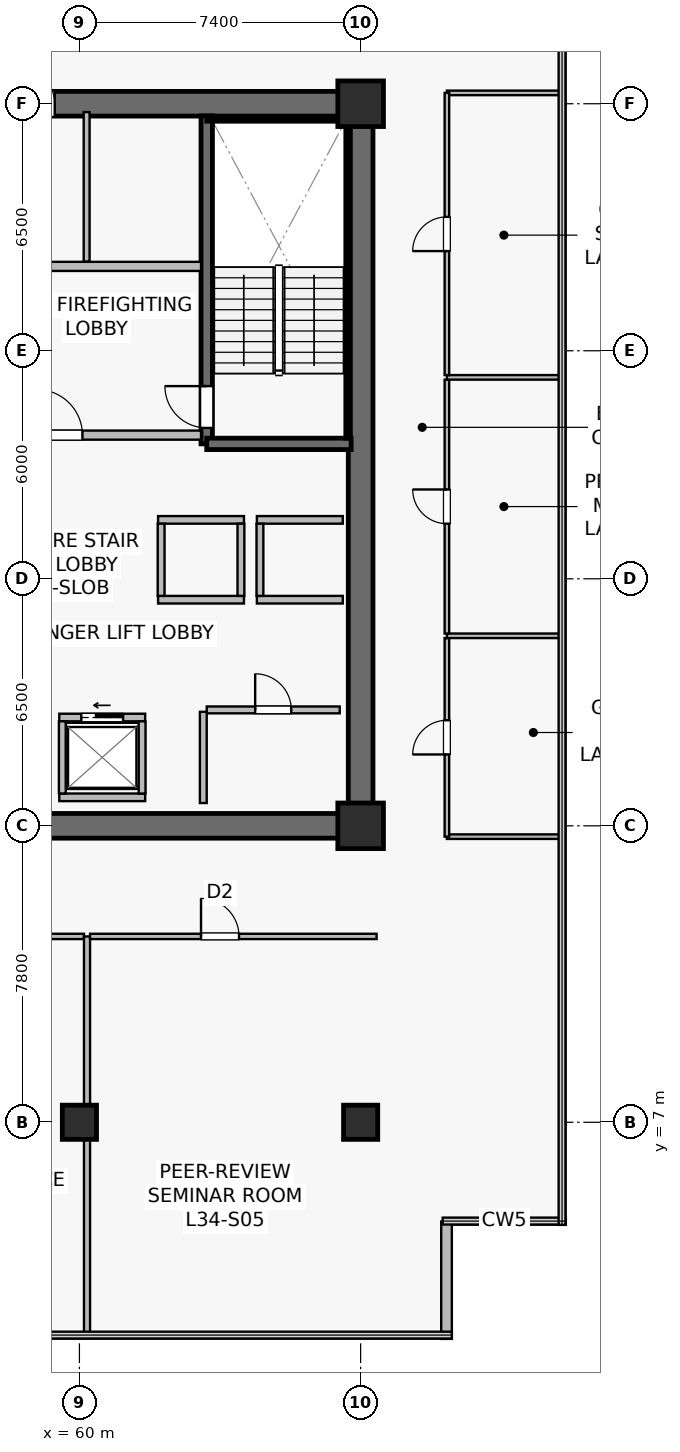
"""IFC4 building model, lengths in metres.
Left out: names, types, materials, properties, quantities, classifications, styles, units other than length and angle.
Written with IfcOpenShell. Run it as: python <this file> out.ifc"""

import sys

from ifc_helpers import new_model, si_unit, direction, frame, frame_2d, origin, origin_2d, place, context, subcontext, project, spatial, rectangle, extrude, source, transform, mapped, element, fill, save


model = new_model("IFC4")
c1 = context("Model", 3, precision=1e-05, world=origin(), true_north=direction((0.0, 1.0)))
c2 = subcontext(c1, "Body", "Model", "MODEL_VIEW")
j1 = project(units=[si_unit("LENGTHUNIT", "METRE"), si_unit("PLANEANGLEUNIT", "RADIAN")], contexts=[c1])
p1 = place(None, origin())
s1 = spatial("IfcSite", under=j1, at=p1, CompositionType="ELEMENT")
p2 = place(p1, origin())
s2 = spatial("IfcBuilding", under=s1, at=p2, CompositionType="ELEMENT")
p3 = place(p2, frame((0.0, 0.0, 142.0)))
s3 = spatial("IfcBuildingStorey", under=s2, at=p3, CompositionType="ELEMENT", Elevation=142.0)
p4 = place(p3, frame((52.275, 14.8, 0.0), z_axis=(0.0, 0.0, 1.0), x_axis=(1.0, 0.0, 0.0)))
e1 = element("IfcWall", 1, at=p4, inside=s3, PredefinedType="SHEAR", context=c2, shape_type="SweptSolid", body=[
    extrude(rectangle(XDim=15.45, YDim=0.65, at=frame_2d((7.725, 0.0))), origin(), (0.0, 0.0, 1.0), 3.79),
])
p5 = place(p3, frame((52.275, 33.8, 0.0), z_axis=(0.0, 0.0, 1.0), x_axis=(1.0, 0.0, 0.0)))
e2 = element("IfcWall", 2, at=p5, inside=s3, PredefinedType="SHEAR", context=c2, shape_type="SweptSolid", body=[
    extrude(rectangle(XDim=15.45, YDim=0.65, at=frame_2d((7.725, 0.0))), origin(), (0.0, 0.0, 1.0), 3.79),
])
p6 = place(p5, frame((6.125, 0.0, 0.0)))
e3 = element("IfcOpeningElement", 3, at=p6, cuts=e2, PredefinedType="OPENING", context=c2, shape_type="SweptSolid", body=[
    extrude(rectangle(XDim=0.95, YDim=2.15, at=frame_2d((0.475, 1.075))), frame((0.0, 0.335, 0.0), z_axis=(0.0, -1.0, 0.0), x_axis=(1.0, 0.0, 0.0)), (0.0, 0.0, 1.0), 0.67),
])
p7 = place(p5, frame((2.585, 0.0, 0.0)))
e4 = element("IfcOpeningElement", 4, at=p7, cuts=e2, PredefinedType="OPENING", context=c2, shape_type="SweptSolid", body=[
    extrude(rectangle(XDim=0.95, YDim=2.15, at=frame_2d((0.475, 1.075))), frame((0.0, 0.335, 0.0), z_axis=(0.0, -1.0, 0.0), x_axis=(1.0, 0.0, 0.0)), (0.0, 0.0, 1.0), 0.67),
])
p8 = place(p3, frame((67.4, 15.125, 0.0), z_axis=(0.0, 0.0, 1.0), x_axis=(0.0, 1.0, 0.0)))
e5 = element("IfcWall", 5, at=p8, inside=s3, PredefinedType="SHEAR", context=c2, shape_type="SweptSolid", body=[
    extrude(rectangle(XDim=18.35, YDim=0.65, at=frame_2d((9.175, 0.0))), origin(), (0.0, 0.0, 1.0), 3.79),
])
p9 = place(p3, frame((63.35, 24.85, 0.0), z_axis=(0.0, 0.0, 1.0), x_axis=(0.0, 1.0, 0.0)))
e6 = element("IfcWall", 6, at=p9, inside=s3, PredefinedType="SHEAR", context=c2, shape_type="SweptSolid", body=[
    extrude(rectangle(XDim=8.63, YDim=0.3, at=frame_2d((4.315, 0.0))), origin(), (0.0, 0.0, 1.0), 3.79),
])
p10 = place(p9, frame((0.42, 0.0, 0.0)))
e7 = element("IfcOpeningElement", 7, at=p10, cuts=e6, PredefinedType="OPENING", context=c2, shape_type="SweptSolid", body=[
    extrude(rectangle(XDim=1.1, YDim=2.15, at=frame_2d((0.55, 1.075))), frame((0.0, 0.16, 0.0), z_axis=(0.0, -1.0, 0.0), x_axis=(1.0, 0.0, 0.0)), (0.0, 0.0, 1.0), 0.32),
])
p11 = place(p3, frame((63.35, 24.85, 0.0), z_axis=(0.0, 0.0, 1.0), x_axis=(1.0, 0.0, 0.0)))
e8 = element("IfcWall", 8, at=p11, inside=s3, PredefinedType="SHEAR", context=c2, shape_type="SweptSolid", body=[
    extrude(rectangle(XDim=3.8, YDim=0.3, at=frame_2d((1.9, 0.0))), origin(), (0.0, 0.0, 1.0), 3.79),
])
p12 = place(p3, frame((63.35, 33.4, 0.0), z_axis=(0.0, 0.0, 1.0), x_axis=(1.0, 0.0, 0.0)))
e9 = element("IfcWall", 9, at=p12, inside=s3, PredefinedType="SOLIDWALL", context=c2, shape_type="SweptSolid", body=[
    extrude(rectangle(XDim=3.72, YDim=0.12, at=frame_2d((1.86, 0.0))), origin(), (0.0, 0.0, 1.0), 3.79),
])
p13 = place(p3, frame((67.07, 25.0, 0.0), z_axis=(0.0, 0.0, 1.0), x_axis=(0.0, 1.0, 0.0)))
e10 = element("IfcWall", 10, at=p13, inside=s3, PredefinedType="SOLIDWALL", context=c2, shape_type="SweptSolid", body=[
    extrude(rectangle(XDim=8.32, YDim=0.12, at=frame_2d((4.16, 0.0))), origin(), (0.0, 0.0, 1.0), 3.79),
])
m1 = source(origin(), c2, "Body", "SweptSolid", [
    extrude(rectangle(XDim=0.9, YDim=0.9, at=origin_2d()), origin(), (0.0, 0.0, 1.0), 4.1),
])
p14 = place(p3, frame((60.0, 7.0, 0.0), z_axis=(0.0, 0.0, 1.0), x_axis=(1.0, 0.0, 0.0)))
e11 = element("IfcColumn", 11, at=p14, inside=s3, PredefinedType="COLUMN", context=c2, shape_type="MappedRepresentation", body=[
    mapped(m1, transform((0.0, 0.0, 0.0), scale=1.0)),
])
m2 = source(origin(), c2, "Body", "SweptSolid", [
    extrude(rectangle(XDim=1.2, YDim=1.2, at=origin_2d()), origin(), (0.0, 0.0, 1.0), 4.1),
])
for number, where, z_axis, x_axis in (
    (12, (67.4, 14.8, 0.0), (0.0, 0.0, 1.0), (1.0, 0.0, 0.0)),
    (13, (67.4, 33.8, 0.0), (0.0, 0.0, 1.0), (1.0, 0.0, 0.0)),
):
    element("IfcColumn", number, at=place(p3, frame(where, z_axis=z_axis, x_axis=x_axis)), inside=s3, PredefinedType="COLUMN", context=c2, shape_type="MappedRepresentation", body=[
        mapped(m2, transform((0.0, 0.0, 0.0), scale=1.0)),
    ])
p15 = place(p3, frame((67.4, 7.0, 0.0), z_axis=(0.0, 0.0, 1.0), x_axis=(1.0, 0.0, 0.0)))
e14 = element("IfcColumn", 14, at=p15, inside=s3, PredefinedType="COLUMN", context=c2, shape_type="MappedRepresentation", body=[
    mapped(m1, transform((0.0, 0.0, 0.0), scale=1.0)),
])
p16 = place(p3, frame((69.66, 1.3, 0.0), z_axis=(0.0, 0.0, 1.0), x_axis=(0.0, 1.0, 0.0)))
e15 = element("IfcWall", 15, at=p16, inside=s3, PredefinedType="STANDARD", context=c2, shape_type="SweptSolid", body=[
    extrude(rectangle(XDim=3.088, YDim=0.28, at=frame_2d((1.544, 0.0))), origin(), (0.0, 0.0, 1.0), 3.79),
])
p17 = place(p3, frame((56.28, 25.08, 0.0), z_axis=(0.0, 0.0, 1.0), x_axis=(1.0, 0.0, 0.0)))
e16 = element("IfcWall", 16, at=p17, inside=s3, PredefinedType="SOLIDWALL", context=c2, shape_type="SweptSolid", body=[
    extrude(rectangle(XDim=6.92, YDim=0.24, at=frame_2d((3.46, 0.0))), origin(), (0.0, 0.0, 1.0), 3.125),
])
p18 = place(p17, frame((2.6, 0.0, 0.0)))
e17 = element("IfcOpeningElement", 17, at=p18, cuts=e16, PredefinedType="OPENING", context=c2, shape_type="SweptSolid", body=[
    extrude(rectangle(XDim=1.2, YDim=2.16, at=frame_2d((0.6, 1.08))), frame((0.0, 0.13, 0.0), z_axis=(0.0, -1.0, 0.0), x_axis=(1.0, 0.0, 0.0)), (0.0, 0.0, 1.0), 0.26),
])
p19 = place(p3, frame((56.28, 29.52, 0.0), z_axis=(0.0, 0.0, 1.0), x_axis=(1.0, 0.0, 0.0)))
e18 = element("IfcWall", 18, at=p19, inside=s3, PredefinedType="SOLIDWALL", context=c2, shape_type="SweptSolid", body=[
    extrude(rectangle(XDim=6.92, YDim=0.24, at=frame_2d((3.46, 0.0))), origin(), (0.0, 0.0, 1.0), 3.125),
])
p20 = place(p3, frame((59.47, 17.65, 0.0), z_axis=(0.0, 0.0, 1.0), x_axis=(1.0, 0.0, 0.0)))
e19 = element("IfcWall", 19, at=p20, inside=s3, PredefinedType="SOLIDWALL", context=c2, shape_type="SweptSolid", body=[
    extrude(rectangle(XDim=2.26, YDim=0.2, at=frame_2d((1.13, 0.0))), origin(), (0.0, 0.0, 1.0), 3.125),
])
p21 = place(p20, frame((0.58, 0.0, 0.0)))
e20 = element("IfcOpeningElement", 20, at=p21, cuts=e19, PredefinedType="OPENING", context=c2, shape_type="SweptSolid", body=[
    extrude(rectangle(XDim=1.1, YDim=2.22, at=frame_2d((0.55, 1.11))), frame((0.0, 0.11, 0.0), z_axis=(0.0, -1.0, 0.0), x_axis=(1.0, 0.0, 0.0)), (0.0, 0.0, 1.0), 0.22),
])
p22 = place(p3, frame((59.47, 15.55, 0.0), z_axis=(0.0, 0.0, 1.0), x_axis=(1.0, 0.0, 0.0)))
e21 = element("IfcWall", 21, at=p22, inside=s3, PredefinedType="SOLIDWALL", context=c2, shape_type="SweptSolid", body=[
    extrude(rectangle(XDim=2.26, YDim=0.2, at=frame_2d((1.13, 0.0))), origin(), (0.0, 0.0, 1.0), 3.125),
])
for number, where, z_axis, x_axis in (
    (22, (59.55, 15.65, 0.0), (0.0, 0.0, 1.0), (0.0, 1.0, 0.0)),
    (23, (61.65, 15.65, 0.0), (0.0, 0.0, 1.0), (0.0, 1.0, 0.0)),
):
    element("IfcWall", number, at=place(p3, frame(where, z_axis=z_axis, x_axis=x_axis)), inside=s3, PredefinedType="SOLIDWALL", context=c2, shape_type="SweptSolid", body=[
        extrude(rectangle(XDim=1.9, YDim=0.18, at=frame_2d((0.95, 0.0))), origin(), (0.0, 0.0, 1.0), 3.79),
    ])
for number, where, z_axis, x_axis in (
    (24, (64.67, 20.75, 0.0), (0.0, 0.0, 1.0), (1.0, 0.0, 0.0)),
    (25, (64.67, 22.85, 0.0), (0.0, 0.0, 1.0), (1.0, 0.0, 0.0)),
):
    element("IfcWall", number, at=place(p3, frame(where, z_axis=z_axis, x_axis=x_axis)), inside=s3, PredefinedType="SOLIDWALL", context=c2, shape_type="SweptSolid", body=[
        extrude(rectangle(XDim=2.26, YDim=0.2, at=frame_2d((1.13, 0.0))), origin(), (0.0, 0.0, 1.0), 3.79),
    ])
p23 = place(p3, frame((64.75, 20.85, 0.0), z_axis=(0.0, 0.0, 1.0), x_axis=(0.0, 1.0, 0.0)))
e26 = element("IfcWall", 26, at=p23, inside=s3, PredefinedType="SOLIDWALL", context=c2, shape_type="SweptSolid", body=[
    extrude(rectangle(XDim=1.9, YDim=0.18, at=frame_2d((0.95, 0.0))), origin(), (0.0, 0.0, 1.0), 3.79),
])
for number, where, z_axis, x_axis in (
    (27, (62.07, 20.75, 0.0), (0.0, 0.0, 1.0), (1.0, 0.0, 0.0)),
    (28, (62.07, 22.85, 0.0), (0.0, 0.0, 1.0), (1.0, 0.0, 0.0)),
):
    element("IfcWall", number, at=place(p3, frame(where, z_axis=z_axis, x_axis=x_axis)), inside=s3, PredefinedType="SOLIDWALL", context=c2, shape_type="SweptSolid", body=[
        extrude(rectangle(XDim=2.26, YDim=0.2, at=frame_2d((1.13, 0.0))), origin(), (0.0, 0.0, 1.0), 3.79),
    ])
for number, where, z_axis, x_axis in (
    (29, (62.15, 20.85, 0.0), (0.0, 0.0, 1.0), (0.0, 1.0, 0.0)),
    (30, (64.25, 20.85, 0.0), (0.0, 0.0, 1.0), (0.0, 1.0, 0.0)),
):
    element("IfcWall", number, at=place(p3, frame(where, z_axis=z_axis, x_axis=x_axis)), inside=s3, PredefinedType="SOLIDWALL", context=c2, shape_type="SweptSolid", body=[
        extrude(rectangle(XDim=1.9, YDim=0.18, at=frame_2d((0.95, 0.0))), origin(), (0.0, 0.0, 1.0), 3.79),
    ])
p24 = place(p3, frame((63.35, 17.85, 0.0), z_axis=(0.0, 0.0, 1.0), x_axis=(1.0, 0.0, 0.0)))
e31 = element("IfcWall", 31, at=p24, inside=s3, PredefinedType="SOLIDWALL", context=c2, shape_type="SweptSolid", body=[
    extrude(rectangle(XDim=3.5, YDim=0.18, at=frame_2d((1.75, 0.0))), origin(), (0.0, 0.0, 1.0), 3.79),
])
p25 = place(p24, frame((1.275, 0.0, 0.0)))
e32 = element("IfcOpeningElement", 32, at=p25, cuts=e31, PredefinedType="OPENING", context=c2, shape_type="SweptSolid", body=[
    extrude(rectangle(XDim=0.95, YDim=2.15, at=frame_2d((0.475, 1.075))), frame((0.0, 0.1, 0.0), z_axis=(0.0, -1.0, 0.0), x_axis=(1.0, 0.0, 0.0)), (0.0, 0.0, 1.0), 0.2),
])
p26 = place(p3, frame((63.26, 15.4, 0.0), z_axis=(0.0, 0.0, 1.0), x_axis=(0.0, 1.0, 0.0)))
e33 = element("IfcWall", 33, at=p26, inside=s3, PredefinedType="SOLIDWALL", context=c2, shape_type="SweptSolid", body=[
    extrude(rectangle(XDim=2.4, YDim=0.18, at=frame_2d((1.2, 0.0))), origin(), (0.0, 0.0, 1.0), 3.79),
])
p27 = place(p3, frame((60.19, 29.65, 0.0), z_axis=(0.0, 0.0, 1.0), x_axis=(0.0, 1.0, 0.0)))
e34 = element("IfcWall", 34, at=p27, inside=s3, PredefinedType="PLUMBINGWALL", context=c2, shape_type="SweptSolid", body=[
    extrude(rectangle(XDim=3.93, YDim=0.155, at=frame_2d((1.965, 0.0))), origin(), (0.0, 0.0, 1.0), 3.125),
])
p28 = place(p3, frame((47.68, 11.89, 0.0), z_axis=(0.0, 0.0, 1.0), x_axis=(1.0, 0.0, 0.0)))
e35 = element("IfcWall", 35, at=p28, inside=s3, PredefinedType="PARTITIONING", context=c2, shape_type="SweptSolid", body=[
    extrude(rectangle(XDim=12.44, YDim=0.14, at=frame_2d((6.22, 0.0))), origin(), (0.0, 0.0, 1.0), 3.125),
])
p29 = place(p28, frame((6.308, 0.0, 0.0)))
e36 = element("IfcOpeningElement", 36, at=p29, cuts=e35, PredefinedType="OPENING", context=c2, shape_type="SweptSolid", body=[
    extrude(rectangle(XDim=1.1, YDim=2.18, at=frame_2d((0.55, 1.09))), frame((0.0, 0.08, 0.0), z_axis=(0.0, -1.0, 0.0), x_axis=(1.0, 0.0, 0.0)), (0.0, 0.0, 1.0), 0.16),
])
p30 = place(p3, frame((60.2, 1.41, 0.0), z_axis=(0.0, 0.0, 1.0), x_axis=(0.0, 1.0, 0.0)))
e37 = element("IfcWall", 37, at=p30, inside=s3, PredefinedType="PARTITIONING", context=c2, shape_type="SweptSolid", body=[
    extrude(rectangle(XDim=10.48, YDim=0.16, at=frame_2d((5.24, 0.0))), origin(), (0.0, 0.0, 1.0), 3.075),
])
p31 = place(p3, frame((60.28, 11.89, 0.0), z_axis=(0.0, 0.0, 1.0), x_axis=(1.0, 0.0, 0.0)))
e38 = element("IfcWall", 38, at=p31, inside=s3, PredefinedType="PARTITIONING", context=c2, shape_type="SweptSolid", body=[
    extrude(rectangle(XDim=7.54, YDim=0.14, at=frame_2d((3.77, 0.0))), origin(), (0.0, 0.0, 1.0), 3.275),
])
p32 = place(p31, frame((2.92, 0.0, 0.0)))
e39 = element("IfcOpeningElement", 39, at=p32, cuts=e38, PredefinedType="OPENING", context=c2, shape_type="SweptSolid", body=[
    extrude(rectangle(XDim=1.0, YDim=2.15, at=frame_2d((0.5, 1.075))), frame((0.0, 0.08, 0.0), z_axis=(0.0, -1.0, 0.0), x_axis=(1.0, 0.0, 0.0)), (0.0, 0.0, 1.0), 0.16),
])
for number, where, z_axis, x_axis in (
    (40, (69.67, 14.515, 0.0), (0.0, 0.0, 1.0), (1.0, 0.0, 0.0)),
    (41, (69.67, 34.085, 0.0), (0.0, 0.0, 1.0), (1.0, 0.0, 0.0)),
):
    element("IfcWall", number, at=place(p3, frame(where, z_axis=z_axis, x_axis=x_axis)), inside=s3, PredefinedType="PARTITIONING", context=c2, shape_type="SweptSolid", body=[
        extrude(rectangle(XDim=3.02, YDim=0.12, at=frame_2d((1.51, 0.0))), origin(), (0.0, 0.0, 1.0), 3.79),
    ])
p33 = place(p3, frame((69.67, 14.515, 0.0), z_axis=(0.0, 0.0, 1.0), x_axis=(0.0, 1.0, 0.0)))
e42 = element("IfcWall", 42, at=p33, inside=s3, PredefinedType="PARTITIONING", context=c2, shape_type="SweptSolid", body=[
    extrude(rectangle(XDim=5.225, YDim=0.12, at=frame_2d((2.613, 0.0))), origin(), (0.0, 0.0, 1.0), 3.79),
])
p34 = place(p33, frame((2.163, 0.0, 0.0)))
e43 = element("IfcOpeningElement", 43, at=p34, cuts=e42, PredefinedType="OPENING", context=c2, shape_type="SweptSolid", body=[
    extrude(rectangle(XDim=0.9, YDim=2.1, at=frame_2d((0.45, 1.05))), frame((0.0, 0.07, 0.0), z_axis=(0.0, -1.0, 0.0), x_axis=(1.0, 0.0, 0.0)), (0.0, 0.0, 1.0), 0.14),
])
p35 = place(p3, frame((69.67, 19.8, 0.0), z_axis=(0.0, 0.0, 1.0), x_axis=(1.0, 0.0, 0.0)))
e44 = element("IfcWall", 44, at=p35, inside=s3, PredefinedType="PARTITIONING", context=c2, shape_type="SweptSolid", body=[
    extrude(rectangle(XDim=3.02, YDim=0.12, at=frame_2d((1.51, 0.0))), origin(), (0.0, 0.0, 1.0), 3.79),
])
p36 = place(p3, frame((69.67, 19.86, 0.0), z_axis=(0.0, 0.0, 1.0), x_axis=(0.0, 1.0, 0.0)))
e45 = element("IfcWall", 45, at=p36, inside=s3, PredefinedType="PARTITIONING", context=c2, shape_type="SweptSolid", body=[
    extrude(rectangle(XDim=6.68, YDim=0.12, at=frame_2d((3.34, 0.0))), origin(), (0.0, 0.0, 1.0), 3.79),
])
p37 = place(p36, frame((2.89, 0.0, 0.0)))
e46 = element("IfcOpeningElement", 46, at=p37, cuts=e45, PredefinedType="OPENING", context=c2, shape_type="SweptSolid", body=[
    extrude(rectangle(XDim=0.9, YDim=2.1, at=frame_2d((0.45, 1.05))), frame((0.0, 0.07, 0.0), z_axis=(0.0, -1.0, 0.0), x_axis=(1.0, 0.0, 0.0)), (0.0, 0.0, 1.0), 0.14),
])
p38 = place(p3, frame((69.67, 26.6, 0.0), z_axis=(0.0, 0.0, 1.0), x_axis=(1.0, 0.0, 0.0)))
e47 = element("IfcWall", 47, at=p38, inside=s3, PredefinedType="PARTITIONING", context=c2, shape_type="SweptSolid", body=[
    extrude(rectangle(XDim=3.02, YDim=0.12, at=frame_2d((1.51, 0.0))), origin(), (0.0, 0.0, 1.0), 3.79),
])
p39 = place(p3, frame((69.67, 26.66, 0.0), z_axis=(0.0, 0.0, 1.0), x_axis=(0.0, 1.0, 0.0)))
e48 = element("IfcWall", 48, at=p39, inside=s3, PredefinedType="PARTITIONING", context=c2, shape_type="SweptSolid", body=[
    extrude(rectangle(XDim=7.425, YDim=0.12, at=frame_2d((3.712, 0.0))), origin(), (0.0, 0.0, 1.0), 3.79),
])
p40 = place(p39, frame((3.262, 0.0, 0.0)))
e49 = element("IfcOpeningElement", 49, at=p40, cuts=e48, PredefinedType="OPENING", context=c2, shape_type="SweptSolid", body=[
    extrude(rectangle(XDim=0.9, YDim=2.1, at=frame_2d((0.45, 1.05))), frame((0.0, 0.07, 0.0), z_axis=(0.0, -1.0, 0.0), x_axis=(1.0, 0.0, 0.0)), (0.0, 0.0, 1.0), 0.14),
])
m3 = source(origin(), c2, "Body", "SweptSolid", [
    extrude(rectangle(XDim=1.1, YDim=2.15, at=frame_2d((0.55, 1.075))), frame((0.0, 0.025, 0.0), z_axis=(0.0, -1.0, 0.0), x_axis=(1.0, 0.0, 0.0)), (0.0, 0.0, 1.0), 0.05),
])
p41 = place(p10, origin())
e50 = element("IfcDoor", 50, at=p41, inside=s3, OperationType="SINGLE_SWING_RIGHT", PredefinedType="DOOR", context=c2, shape_type="MappedRepresentation", body=[
    mapped(m3, transform((0.0, 0.0, 0.0), scale=1.0)),
])
fill(e7, e50)
m4 = source(origin(), c2, "Body", "SweptSolid", [
    extrude(rectangle(XDim=1.2, YDim=2.16, at=frame_2d((0.6, 1.08))), frame((0.0, 0.025, 0.0), z_axis=(0.0, -1.0, 0.0), x_axis=(1.0, 0.0, 0.0)), (0.0, 0.0, 1.0), 0.05),
])
p42 = place(p18, origin())
e51 = element("IfcDoor", 51, at=p42, inside=s3, OperationType="SINGLE_SWING_LEFT", PredefinedType="DOOR", context=c2, shape_type="MappedRepresentation", body=[
    mapped(m4, transform((0.0, 0.0, 0.0), scale=1.0)),
])
fill(e17, e51)
m5 = source(origin(), c2, "Body", "SweptSolid", [
    extrude(rectangle(XDim=1.1, YDim=2.22, at=frame_2d((0.55, 1.11))), frame((0.0, 0.025, 0.0), z_axis=(0.0, -1.0, 0.0), x_axis=(1.0, 0.0, 0.0)), (0.0, 0.0, 1.0), 0.05),
])
p43 = place(p21, origin())
e52 = element("IfcDoor", 52, at=p43, inside=s3, OperationType="SLIDING_TO_LEFT", PredefinedType="USERDEFINED", context=c2, shape_type="MappedRepresentation", body=[
    mapped(m5, transform((0.0, 0.0, 0.0), scale=1.0)),
])
fill(e20, e52)
m6 = source(origin(), c2, "Body", "SweptSolid", [
    extrude(rectangle(XDim=0.95, YDim=2.15, at=frame_2d((0.475, 1.075))), frame((0.0, 0.025, 0.0), z_axis=(0.0, -1.0, 0.0), x_axis=(1.0, 0.0, 0.0)), (0.0, 0.0, 1.0), 0.05),
])
p44 = place(p25, origin())
e53 = element("IfcDoor", 53, at=p44, inside=s3, OperationType="SINGLE_SWING_LEFT", PredefinedType="DOOR", context=c2, shape_type="MappedRepresentation", body=[
    mapped(m6, transform((0.0, 0.0, 0.0), scale=1.0)),
])
fill(e32, e53)
p45 = place(p6, origin())
e54 = element("IfcDoor", 54, at=p45, inside=s3, OperationType="SINGLE_SWING_LEFT", PredefinedType="DOOR", context=c2, shape_type="MappedRepresentation", body=[
    mapped(m6, transform((0.0, 0.0, 0.0), scale=1.0)),
])
fill(e3, e54)
m7 = source(origin(), c2, "Body", "SweptSolid", [
    extrude(rectangle(XDim=1.0, YDim=2.15, at=frame_2d((0.5, 1.075))), frame((0.0, 0.025, 0.0), z_axis=(0.0, -1.0, 0.0), x_axis=(1.0, 0.0, 0.0)), (0.0, 0.0, 1.0), 0.05),
])
p46 = place(p32, origin())
e55 = element("IfcDoor", 55, at=p46, inside=s3, OperationType="SINGLE_SWING_LEFT", PredefinedType="DOOR", context=c2, shape_type="MappedRepresentation", body=[
    mapped(m7, transform((0.0, 0.0, 0.0), scale=1.0)),
])
fill(e39, e55)
m8 = source(origin(), c2, "Body", "SweptSolid", [
    extrude(rectangle(XDim=0.9, YDim=2.1, at=frame_2d((0.45, 1.05))), frame((0.0, 0.025, 0.0), z_axis=(0.0, -1.0, 0.0), x_axis=(1.0, 0.0, 0.0)), (0.0, 0.0, 1.0), 0.05),
])
p47 = place(p34, origin())
e56 = element("IfcDoor", 56, at=p47, inside=s3, OperationType="SINGLE_SWING_LEFT", PredefinedType="DOOR", context=c2, shape_type="MappedRepresentation", body=[
    mapped(m8, transform((0.0, 0.0, 0.0), scale=1.0)),
])
fill(e43, e56)
p48 = place(p37, origin())
e57 = element("IfcDoor", 57, at=p48, inside=s3, OperationType="SINGLE_SWING_RIGHT", PredefinedType="DOOR", context=c2, shape_type="MappedRepresentation", body=[
    mapped(m8, transform((0.0, 0.0, 0.0), scale=1.0)),
])
fill(e46, e57)
p49 = place(p40, origin())
e58 = element("IfcDoor", 58, at=p49, inside=s3, OperationType="SINGLE_SWING_LEFT", PredefinedType="DOOR", context=c2, shape_type="MappedRepresentation", body=[
    mapped(m8, transform((0.0, 0.0, 0.0), scale=1.0)),
])
fill(e49, e58)
save(model, sys.argv[1])
